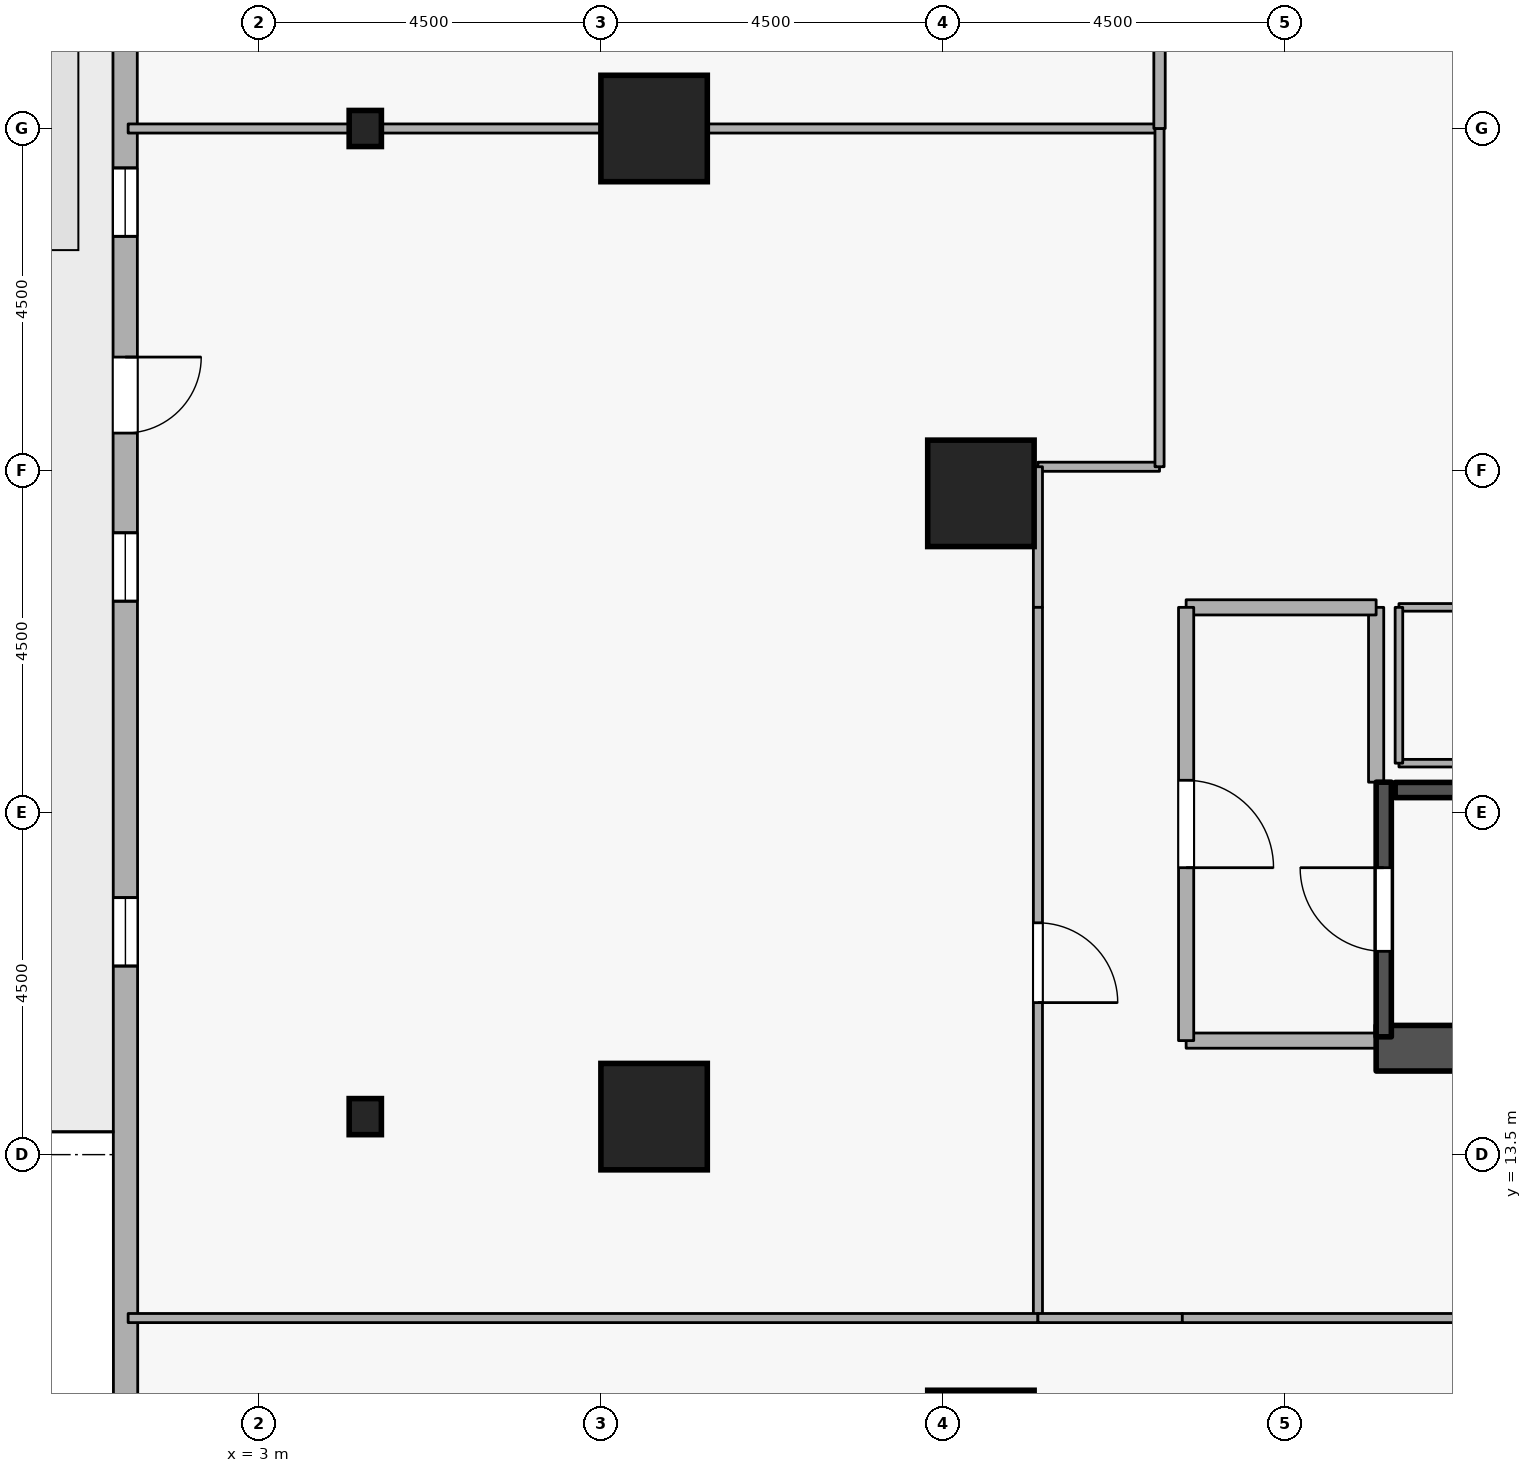
"""IFC4 building model, lengths in metres.
Left out: names, types, materials, properties, quantities, classifications, styles, units other than length and angle.
Written with IfcOpenShell. Run it as: python <this file> out.ifc"""

import sys

from ifc_helpers import new_model, si_unit, direction, frame, frame_2d, origin, origin_2d, place, context, subcontext, project, spatial, rectangle, i_section, extrude, element, fill, save


model = new_model("IFC4")
c1 = context("Model", 3, precision=1e-05, world=origin(), true_north=direction((0.0, 1.0)))
c2 = subcontext(c1, "Body", "Model", "MODEL_VIEW")
j1 = project(units=[si_unit("LENGTHUNIT", "METRE"), si_unit("PLANEANGLEUNIT", "RADIAN")], contexts=[c1])
p1 = place(None, origin())
s1 = spatial("IfcSite", under=j1, at=p1, CompositionType="ELEMENT")
p2 = place(p1, origin())
s2 = spatial("IfcBuilding", under=s1, at=p2, CompositionType="ELEMENT")
p3 = place(p2, frame((0.0, 0.0, 27.9)))
s3 = spatial("IfcBuildingStorey", under=s2, at=p3, CompositionType="ELEMENT", Elevation=27.9)
p4 = place(p3, frame((17.7, 14.9, 0.0), z_axis=(0.0, 0.0, 1.0), x_axis=(1.0, 0.0, 0.0)))
e1 = element("IfcWall", 1, at=p4, inside=s3, PredefinedType="SHEAR", context=c2, shape_type="SweptSolid", body=[
    extrude(rectangle(XDim=15.6, YDim=0.6, at=frame_2d((7.8, 0.0))), origin(), (0.0, 0.0, 1.0), 3.6),
])
for number, where, z_axis, x_axis in (
    (2, (12.5, 9.7, 0.0), (0.0, 0.0, 1.0), (1.0, 0.0, 0.0)),
    (3, (8.2, 14.0, 0.0), (0.0, 0.0, 1.0), (1.0, 0.0, 0.0)),
    (4, (8.2, 27.0, 0.0), (0.0, 0.0, 1.0), (1.0, 0.0, 0.0)),
    (5, (12.5, 22.2, 0.0), (0.0, 0.0, 1.0), (1.0, 0.0, 0.0)),
):
    element("IfcColumn", number, at=place(p3, frame(where, z_axis=z_axis, x_axis=x_axis)), inside=s3, PredefinedType="COLUMN", context=c2, shape_type="SweptSolid", body=[
        extrude(rectangle(XDim=1.4, YDim=1.4, at=origin_2d()), origin(), (0.0, 0.0, 1.0), 3.6),
    ])
for number, where, z_axis, x_axis in (
    (6, (4.4, 14.0, 0.0), (0.0, 0.0, 1.0), (1.0, 0.0, 0.0)),
    (7, (4.4, 27.0, 0.0), (0.0, 0.0, 1.0), (1.0, 0.0, 0.0)),
):
    element("IfcColumn", number, at=place(p3, frame(where, z_axis=z_axis, x_axis=x_axis)), inside=s3, PredefinedType="COLUMN", context=c2, shape_type="SweptSolid", body=[
        extrude(i_section(OverallWidth=0.424, OverallDepth=0.475, WebThickness=0.048, FlangeThickness=0.077, FilletRadius=0.015, at=origin_2d()), origin(), (0.0, 0.0, 1.0), 3.6),
    ])
p5 = place(p3, frame((1.235, 42.681, 0.0), z_axis=(0.0, 0.0, 1.0), x_axis=(0.000339718087, -0.999999942296, 0.0)))
e8 = element("IfcWall", 8, at=p5, inside=s3, PredefinedType="STANDARD", context=c2, shape_type="SweptSolid", body=[
    extrude(rectangle(XDim=33.777, YDim=0.32, at=frame_2d((16.888, 0.0))), origin(), (0.0, 0.0, 1.0), 2.7),
])
p6 = place(p5, frame((18.688, 0.0, 0.0)))
e9 = element("IfcOpeningElement", 9, at=p6, cuts=e8, PredefinedType="OPENING", context=c2, shape_type="SweptSolid", body=[
    extrude(rectangle(XDim=1.0, YDim=2.08, at=frame_2d((0.5, 1.04))), frame((0.0, 0.17, 0.0), z_axis=(0.0, -1.0, 0.0), x_axis=(1.0, 0.0, 0.0)), (0.0, 0.0, 1.0), 0.34),
])
p7 = place(p5, frame((1.8, 0.0, 0.72)))
e10 = element("IfcOpeningElement", 10, at=p7, cuts=e8, PredefinedType="OPENING", context=c2, shape_type="SweptSolid", body=[
    extrude(rectangle(XDim=0.9, YDim=1.75, at=frame_2d((0.45, 0.875))), frame((0.0, 0.17, 0.0), z_axis=(0.0, -1.0, 0.0), x_axis=(1.0, 0.0, 0.0)), (0.0, 0.0, 1.0), 0.34),
])
p8 = place(p5, frame((6.6, 0.0, 0.72)))
e11 = element("IfcOpeningElement", 11, at=p8, cuts=e8, PredefinedType="OPENING", context=c2, shape_type="SweptSolid", body=[
    extrude(rectangle(XDim=0.9, YDim=1.75, at=frame_2d((0.45, 0.875))), frame((0.0, 0.17, 0.0), z_axis=(0.0, -1.0, 0.0), x_axis=(1.0, 0.0, 0.0)), (0.0, 0.0, 1.0), 0.34),
])
p9 = place(p5, frame((11.4, 0.0, 0.72)))
e12 = element("IfcOpeningElement", 12, at=p9, cuts=e8, PredefinedType="OPENING", context=c2, shape_type="SweptSolid", body=[
    extrude(rectangle(XDim=0.9, YDim=1.75, at=frame_2d((0.45, 0.875))), frame((0.0, 0.17, 0.0), z_axis=(0.0, -1.0, 0.0), x_axis=(1.0, 0.0, 0.0)), (0.0, 0.0, 1.0), 0.34),
])
p10 = place(p5, frame((16.2, 0.0, 0.72)))
e13 = element("IfcOpeningElement", 13, at=p10, cuts=e8, PredefinedType="OPENING", context=c2, shape_type="SweptSolid", body=[
    extrude(rectangle(XDim=0.9, YDim=1.75, at=frame_2d((0.45, 0.875))), frame((0.0, 0.17, 0.0), z_axis=(0.0, -1.0, 0.0), x_axis=(1.0, 0.0, 0.0)), (0.0, 0.0, 1.0), 0.34),
])
p11 = place(p5, frame((21.0, 0.0, 0.72)))
e14 = element("IfcOpeningElement", 14, at=p11, cuts=e8, PredefinedType="OPENING", context=c2, shape_type="SweptSolid", body=[
    extrude(rectangle(XDim=0.9, YDim=1.75, at=frame_2d((0.45, 0.875))), frame((0.0, 0.17, 0.0), z_axis=(0.0, -1.0, 0.0), x_axis=(1.0, 0.0, 0.0)), (0.0, 0.0, 1.0), 0.34),
])
p12 = place(p5, frame((25.8, 0.0, 0.72)))
e15 = element("IfcOpeningElement", 15, at=p12, cuts=e8, PredefinedType="OPENING", context=c2, shape_type="SweptSolid", body=[
    extrude(rectangle(XDim=0.9, YDim=1.75, at=frame_2d((0.45, 0.875))), frame((0.0, 0.17, 0.0), z_axis=(0.0, -1.0, 0.0), x_axis=(1.0, 0.0, 0.0)), (0.0, 0.0, 1.0), 0.34),
])
p13 = place(p3, frame((17.8, 15.05, 0.0), z_axis=(0.0, 0.0, 1.0), x_axis=(0.0, 1.0, 0.0)))
e16 = element("IfcWall", 16, at=p13, inside=s3, PredefinedType="SHEAR", context=c2, shape_type="SweptSolid", body=[
    extrude(rectangle(XDim=3.35, YDim=0.2, at=frame_2d((1.675, 0.0))), origin(), (0.0, 0.0, 1.0), 3.6),
])
p14 = place(p13, frame((1.125, 0.0, 0.0)))
e17 = element("IfcOpeningElement", 17, at=p14, cuts=e16, PredefinedType="OPENING", context=c2, shape_type="SweptSolid", body=[
    extrude(rectangle(XDim=1.1, YDim=2.1, at=frame_2d((0.55, 1.05))), frame((0.0, 0.11, 0.0), z_axis=(0.0, -1.0, 0.0), x_axis=(1.0, 0.0, 0.0)), (0.0, 0.0, 1.0), 0.22),
])
p15 = place(p3, frame((25.05, 18.297, 0.0), z_axis=(0.0, 0.0, 1.0), x_axis=(-1.0, 0.0, 0.0)))
e18 = element("IfcWall", 18, at=p15, inside=s3, PredefinedType="SHEAR", context=c2, shape_type="SweptSolid", body=[
    extrude(rectangle(XDim=7.1, YDim=0.2, at=frame_2d((3.55, 0.0))), origin(), (0.0, 0.0, 1.0), 3.6),
])
p16 = place(p3, frame((15.2, 15.0, 0.0), z_axis=(0.0, 0.0, 1.0), x_axis=(1.0, 0.0, 0.0)))
e19 = element("IfcWall", 19, at=p16, inside=s3, PredefinedType="STANDARD", context=c2, shape_type="SweptSolid", body=[
    extrude(rectangle(XDim=2.5, YDim=0.2, at=frame_2d((1.25, 0.0))), origin(), (0.0, 0.0, 1.0), 3.34),
])
p17 = place(p3, frame((17.7, 18.4, 0.0), z_axis=(0.0, 0.0, 1.0), x_axis=(0.0, 1.0, 0.0)))
e20 = element("IfcWall", 20, at=p17, inside=s3, PredefinedType="STANDARD", context=c2, shape_type="SweptSolid", body=[
    extrude(rectangle(XDim=2.3, YDim=0.2, at=frame_2d((1.15, 0.0))), origin(), (0.0, 0.0, 1.0), 2.545),
])
p18 = place(p3, frame((17.7, 20.7, 0.0), z_axis=(0.0, 0.0, 1.0), x_axis=(-1.0, 0.0, 0.0)))
e21 = element("IfcWall", 21, at=p18, inside=s3, PredefinedType="STANDARD", context=c2, shape_type="SweptSolid", body=[
    extrude(rectangle(XDim=2.5, YDim=0.2, at=frame_2d((1.25, 0.0))), origin(), (0.0, 0.0, 1.0), 3.34),
])
p19 = place(p3, frame((15.2, 20.7, 0.0), z_axis=(0.0, 0.0, 1.0), x_axis=(0.0, -1.0, 0.0)))
e22 = element("IfcWall", 22, at=p19, inside=s3, PredefinedType="STANDARD", context=c2, shape_type="SweptSolid", body=[
    extrude(rectangle(XDim=5.7, YDim=0.2, at=frame_2d((2.85, 0.0))), origin(), (0.0, 0.0, 1.0), 3.34),
])
p20 = place(p19, frame((2.275, 0.0, 0.0)))
e23 = element("IfcOpeningElement", 23, at=p20, cuts=e22, PredefinedType="OPENING", context=c2, shape_type="SweptSolid", body=[
    extrude(rectangle(XDim=1.15, YDim=2.1, at=frame_2d((0.575, 1.05))), frame((0.0, 0.11, 0.0), z_axis=(0.0, -1.0, 0.0), x_axis=(1.0, 0.0, 0.0)), (0.0, 0.0, 1.0), 0.22),
])
p21 = place(p3, frame((18.0, 18.65, 0.0), z_axis=(0.0, 0.0, 1.0), x_axis=(1.0, 0.0, 0.0)))
e24 = element("IfcWall", 24, at=p21, inside=s3, PredefinedType="PARTITIONING", context=c2, shape_type="SweptSolid", body=[
    extrude(rectangle(XDim=2.6, YDim=0.1, at=frame_2d((1.3, 0.0))), origin(), (0.0, 0.0, 1.0), 3.34),
])
p22 = place(p3, frame((20.6, 20.7, 0.0), z_axis=(0.0, 0.0, 1.0), x_axis=(-1.0, 0.0, 0.0)))
e25 = element("IfcWall", 25, at=p22, inside=s3, PredefinedType="PARTITIONING", context=c2, shape_type="SweptSolid", body=[
    extrude(rectangle(XDim=2.6, YDim=0.1, at=frame_2d((1.3, 0.0))), origin(), (0.0, 0.0, 1.0), 3.34),
])
p23 = place(p22, frame((0.825, 0.0, 0.0)))
e26 = element("IfcOpeningElement", 26, at=p23, cuts=e25, PredefinedType="OPENING", context=c2, shape_type="SweptSolid", body=[
    extrude(rectangle(XDim=0.95, YDim=2.1, at=frame_2d((0.475, 1.05))), frame((0.0, 0.06, 0.0), z_axis=(0.0, -1.0, 0.0), x_axis=(1.0, 0.0, 0.0)), (0.0, 0.0, 1.0), 0.12),
])
p24 = place(p3, frame((18.0, 20.7, 0.0), z_axis=(0.0, 0.0, 1.0), x_axis=(0.0, -1.0, 0.0)))
e27 = element("IfcWall", 27, at=p24, inside=s3, PredefinedType="PARTITIONING", context=c2, shape_type="SweptSolid", body=[
    extrude(rectangle(XDim=2.05, YDim=0.1, at=frame_2d((1.025, 0.0))), origin(), (0.0, 0.0, 1.0), 2.545),
])
p25 = place(p3, frame((14.85, 22.55, 0.0), z_axis=(0.0, 0.0, 1.0), x_axis=(-1.0, 0.0, 0.0)))
e28 = element("IfcWall", 28, at=p25, inside=s3, PredefinedType="PARTITIONING", context=c2, shape_type="SweptSolid", body=[
    extrude(rectangle(XDim=1.6, YDim=0.12, at=frame_2d((0.8, 0.0))), origin(), (0.0, 0.0, 1.0), 3.34),
])
p26 = place(p3, frame((13.25, 22.55, 0.0), z_axis=(0.0, 0.0, 1.0), x_axis=(0.0, -1.0, 0.0)))
e29 = element("IfcWall", 29, at=p26, inside=s3, PredefinedType="PARTITIONING", context=c2, shape_type="SweptSolid", body=[
    extrude(rectangle(XDim=1.85, YDim=0.12, at=frame_2d((0.925, 0.0))), origin(), (0.0, 0.0, 1.0), 3.34),
])
p27 = place(p3, frame((13.25, 20.7, 0.0), z_axis=(0.0, 0.0, 1.0), x_axis=(0.0, -1.0, 0.0)))
e30 = element("IfcWall", 30, at=p27, inside=s3, PredefinedType="PARTITIONING", context=c2, shape_type="SweptSolid", body=[
    extrude(rectangle(XDim=9.35, YDim=0.12, at=frame_2d((4.675, 0.0))), origin(), (0.0, 0.0, 1.0), 3.34),
])
p28 = place(p27, frame((4.15, 0.0, 0.0)))
e31 = element("IfcOpeningElement", 31, at=p28, cuts=e30, PredefinedType="OPENING", context=c2, shape_type="SweptSolid", body=[
    extrude(rectangle(XDim=1.05, YDim=2.1, at=frame_2d((0.525, 1.05))), frame((0.0, 0.07, 0.0), z_axis=(0.0, -1.0, 0.0), x_axis=(1.0, 0.0, 0.0)), (0.0, 0.0, 1.0), 0.14),
])
p29 = place(p3, frame((13.25, 11.35, 0.0), z_axis=(0.0, 0.0, 1.0), x_axis=(-1.0, 0.0, 0.0)))
e32 = element("IfcWall", 32, at=p29, inside=s3, PredefinedType="PARTITIONING", context=c2, shape_type="SweptSolid", body=[
    extrude(rectangle(XDim=11.97, YDim=0.12, at=frame_2d((5.985, 0.0))), origin(), (0.0, 0.0, 1.0), 3.34),
])
p30 = place(p3, frame((1.28, 27.0, 0.0), z_axis=(0.0, 0.0, 1.0), x_axis=(1.0, 0.0, 0.0)))
e33 = element("IfcWall", 33, at=p30, inside=s3, PredefinedType="PARTITIONING", context=c2, shape_type="SweptSolid", body=[
    extrude(rectangle(XDim=13.57, YDim=0.12, at=frame_2d((6.785, 0.0))), origin(), (0.0, 0.0, 1.0), 2.878),
])
p31 = place(p3, frame((14.85, 27.0, 0.0), z_axis=(0.0, 0.0, 1.0), x_axis=(0.0, -1.0, 0.0)))
e34 = element("IfcWall", 34, at=p31, inside=s3, PredefinedType="PARTITIONING", context=c2, shape_type="SweptSolid", body=[
    extrude(rectangle(XDim=4.45, YDim=0.12, at=frame_2d((2.225, 0.0))), origin(), (0.0, 0.0, 1.0), 3.34),
])
p32 = place(p3, frame((14.85, 31.45, 0.0), z_axis=(0.0, 0.0, 1.0), x_axis=(0.0, -1.0, 0.0)))
e35 = element("IfcWall", 35, at=p32, inside=s3, PredefinedType="PARTITIONING", context=c2, shape_type="SweptSolid", body=[
    extrude(rectangle(XDim=4.45, YDim=0.15, at=frame_2d((2.225, 0.0))), origin(), (0.0, 0.0, 1.0), 3.34),
])
p33 = place(p32, frame((1.575, 0.0, 0.0)))
e36 = element("IfcOpeningElement", 36, at=p33, cuts=e35, PredefinedType="OPENING", context=c2, shape_type="SweptSolid", body=[
    extrude(rectangle(XDim=1.3, YDim=2.12, at=frame_2d((0.65, 1.06))), frame((0.0, 0.085, 0.0), z_axis=(0.0, -1.0, 0.0), x_axis=(1.0, 0.0, 0.0)), (0.0, 0.0, 1.0), 0.17),
])
p34 = place(p3, frame((13.25, 11.35, 0.0), z_axis=(0.0, 0.0, 1.0), x_axis=(1.0, 0.0, 0.0)))
e37 = element("IfcWall", 37, at=p34, inside=s3, PredefinedType="PARTITIONING", context=c2, shape_type="SweptSolid", body=[
    extrude(rectangle(XDim=1.9, YDim=0.12, at=frame_2d((0.95, 0.0))), origin(), (0.0, 0.0, 1.0), 3.34),
])
p35 = place(p3, frame((15.15, 11.35, 0.0), z_axis=(0.0, 0.0, 1.0), x_axis=(1.0, 0.0, 0.0)))
e38 = element("IfcWall", 38, at=p35, inside=s3, PredefinedType="PARTITIONING", context=c2, shape_type="SweptSolid", body=[
    extrude(rectangle(XDim=10.35, YDim=0.12, at=frame_2d((5.175, 0.0))), origin(), (0.0, 0.0, 1.0), 3.34),
])
p36 = place(p35, frame((4.65, 0.0, 0.0)))
e39 = element("IfcOpeningElement", 39, at=p36, cuts=e38, PredefinedType="OPENING", context=c2, shape_type="SweptSolid", body=[
    extrude(rectangle(XDim=1.05, YDim=2.1, at=frame_2d((0.525, 1.05))), frame((0.0, 0.07, 0.0), z_axis=(0.0, -1.0, 0.0), x_axis=(1.0, 0.0, 0.0)), (0.0, 0.0, 1.0), 0.14),
])
p37 = place(p6, origin())
e40 = element("IfcDoor", 40, at=p37, inside=s3, OperationType="SINGLE_SWING_LEFT", PredefinedType="DOOR", context=c2, shape_type="SweptSolid", body=[
    extrude(rectangle(XDim=1.0, YDim=2.08, at=frame_2d((0.5, 1.04))), frame((0.0, 0.025, 0.0), z_axis=(0.0, -1.0, 0.0), x_axis=(1.0, 0.0, 0.0)), (0.0, 0.0, 1.0), 0.05),
])
fill(e9, e40)
p38 = place(p10, origin())
e41 = element("IfcWindow", 41, at=p38, inside=s3, PartitioningType="SINGLE_PANEL", PredefinedType="WINDOW", context=c2, shape_type="SweptSolid", body=[
    extrude(rectangle(XDim=0.9, YDim=1.75, at=frame_2d((0.45, 0.875))), frame((0.0, 0.03, 0.0), z_axis=(0.0, -1.0, 0.0), x_axis=(1.0, 0.0, 0.0)), (0.0, 0.0, 1.0), 0.06),
])
fill(e13, e41)
p39 = place(p11, origin())
e42 = element("IfcWindow", 42, at=p39, inside=s3, PartitioningType="SINGLE_PANEL", PredefinedType="WINDOW", context=c2, shape_type="SweptSolid", body=[
    extrude(rectangle(XDim=0.9, YDim=1.75, at=frame_2d((0.45, 0.875))), frame((0.0, 0.03, 0.0), z_axis=(0.0, -1.0, 0.0), x_axis=(1.0, 0.0, 0.0)), (0.0, 0.0, 1.0), 0.06),
])
fill(e14, e42)
p40 = place(p12, origin())
e43 = element("IfcWindow", 43, at=p40, inside=s3, PartitioningType="SINGLE_PANEL", PredefinedType="WINDOW", context=c2, shape_type="SweptSolid", body=[
    extrude(rectangle(XDim=0.9, YDim=1.75, at=frame_2d((0.45, 0.875))), frame((0.0, 0.03, 0.0), z_axis=(0.0, -1.0, 0.0), x_axis=(1.0, 0.0, 0.0)), (0.0, 0.0, 1.0), 0.06),
])
fill(e15, e43)
p41 = place(p14, origin())
e44 = element("IfcDoor", 44, at=p41, inside=s3, OperationType="SINGLE_SWING_RIGHT", PredefinedType="DOOR", context=c2, shape_type="SweptSolid", body=[
    extrude(rectangle(XDim=1.1, YDim=2.1, at=frame_2d((0.55, 1.05))), frame((0.0, 0.025, 0.0), z_axis=(0.0, -1.0, 0.0), x_axis=(1.0, 0.0, 0.0)), (0.0, 0.0, 1.0), 0.05),
])
fill(e17, e44)
p42 = place(p20, origin())
e45 = element("IfcDoor", 45, at=p42, inside=s3, OperationType="SINGLE_SWING_RIGHT", PredefinedType="DOOR", context=c2, shape_type="SweptSolid", body=[
    extrude(rectangle(XDim=1.15, YDim=2.1, at=frame_2d((0.575, 1.05))), frame((0.0, 0.025, 0.0), z_axis=(0.0, -1.0, 0.0), x_axis=(1.0, 0.0, 0.0)), (0.0, 0.0, 1.0), 0.05),
])
fill(e23, e45)
p43 = place(p28, origin())
e46 = element("IfcDoor", 46, at=p43, inside=s3, OperationType="SINGLE_SWING_RIGHT", PredefinedType="DOOR", context=c2, shape_type="SweptSolid", body=[
    extrude(rectangle(XDim=1.05, YDim=2.1, at=frame_2d((0.525, 1.05))), frame((0.0, 0.025, 0.0), z_axis=(0.0, -1.0, 0.0), x_axis=(1.0, 0.0, 0.0)), (0.0, 0.0, 1.0), 0.05),
])
fill(e31, e46)
save(model, sys.argv[1])
